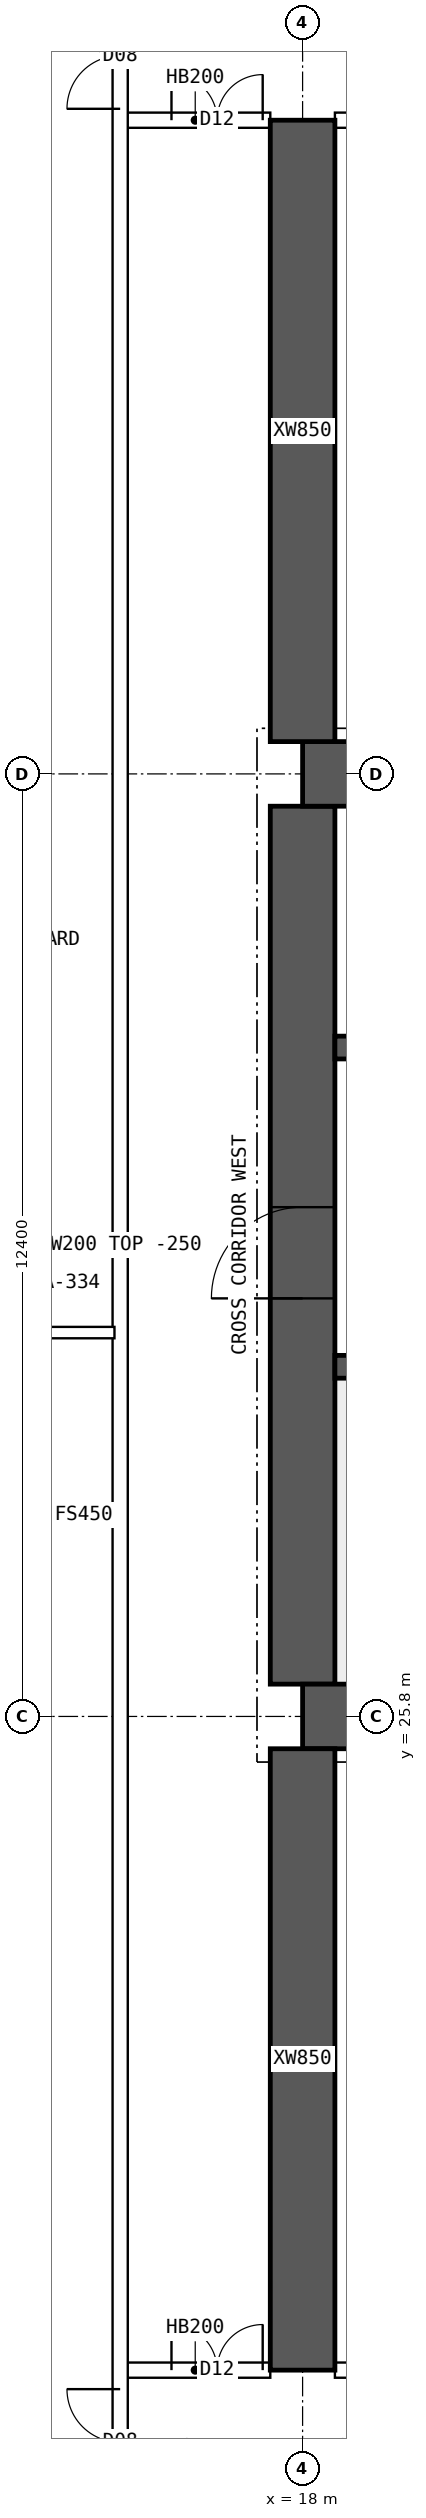
"""IFC4 building model, lengths in metres.
Left out: names, types, materials, properties, quantities, classifications, styles, units other than length and angle.
Written with IfcOpenShell. Run it as: python <this file> out.ifc"""

import sys

from ifc_helpers import new_model, si_unit, direction, frame, frame_2d, origin, place, context, subcontext, project, spatial, polyline, rectangle, outline, extrude, element, fill, save


model = new_model("IFC4")
c1 = context("Model", 3, precision=1e-05, world=origin(), true_north=direction((0.0, 1.0)))
c2 = subcontext(c1, "Body", "Model", "MODEL_VIEW")
j1 = project(units=[si_unit("LENGTHUNIT", "METRE"), si_unit("PLANEANGLEUNIT", "RADIAN")], contexts=[c1])
p1 = place(None, origin())
s1 = spatial("IfcSite", under=j1, at=p1, CompositionType="ELEMENT")
p2 = place(p1, origin())
s2 = spatial("IfcBuilding", under=s1, at=p2, CompositionType="ELEMENT")
p3 = place(p2, frame((0.0, 0.0, 193.6)))
s3 = spatial("IfcBuildingStorey", under=s2, at=p3, CompositionType="ELEMENT", Elevation=193.6)
for number, where, z_axis, x_axis in (
    (1, (18.0, 25.8, 0.0), (0.0, 0.0, 1.0), (1.0, 0.0, 0.0)),
    (2, (18.0, 38.2, 0.0), (0.0, 0.0, 1.0), (1.0, 0.0, 0.0)),
):
    element("IfcWall", number, at=place(p3, frame(where, z_axis=z_axis, x_axis=x_axis)), inside=s3, PredefinedType="SHEAR", context=c2, shape_type="SweptSolid", body=[
        extrude(rectangle(XDim=48.0, YDim=0.85, at=frame_2d((24.0, 0.0))), origin(), (0.0, 0.0, 1.0), 3.75),
    ])
p4 = place(p3, frame((18.0, 26.225, 0.0), z_axis=(0.0, 0.0, 1.0), x_axis=(0.0, 1.0, 0.0)))
e3 = element("IfcWall", 3, at=p4, inside=s3, PredefinedType="SHEAR", context=c2, shape_type="SweptSolid", body=[
    extrude(rectangle(XDim=11.55, YDim=0.85, at=frame_2d((5.775, 0.0))), origin(), (0.0, 0.0, 1.0), 3.75),
])
p5 = place(p4, frame((5.075, 0.0, 0.0)))
e4 = element("IfcOpeningElement", 4, at=p5, cuts=e3, PredefinedType="OPENING", context=c2, shape_type="SweptSolid", body=[
    extrude(rectangle(XDim=1.2, YDim=2.1, at=frame_2d((0.6, 1.05))), frame((0.0, 0.435, 0.0), z_axis=(0.0, -1.0, 0.0), x_axis=(1.0, 0.0, 0.0)), (0.0, 0.0, 1.0), 0.87),
])
p6 = place(p3, frame((18.425, 30.4, 0.0), z_axis=(0.0, 0.0, 1.0), x_axis=(1.0, 0.0, 0.0)))
e5 = element("IfcWall", 5, at=p6, inside=s3, PredefinedType="SHEAR", context=c2, shape_type="SweptSolid", body=[
    extrude(rectangle(XDim=47.15, YDim=0.3, at=frame_2d((23.575, 0.0))), origin(), (0.0, 0.0, 1.0), 3.75),
])
p7 = place(p6, frame((0.4, 0.0, 0.0)))
e6 = element("IfcOpeningElement", 6, at=p7, cuts=e5, PredefinedType="OPENING", context=c2, shape_type="SweptSolid", body=[
    extrude(rectangle(XDim=1.0, YDim=2.1, at=frame_2d((0.5, 1.05))), frame((0.0, 0.16, 0.0), z_axis=(0.0, -1.0, 0.0), x_axis=(1.0, 0.0, 0.0)), (0.0, 0.0, 1.0), 0.32),
])
p8 = place(p6, frame((45.75, 0.0, 0.0)))
e7 = element("IfcOpeningElement", 7, at=p8, cuts=e5, PredefinedType="OPENING", context=c2, shape_type="SweptSolid", body=[
    extrude(rectangle(XDim=1.0, YDim=2.1, at=frame_2d((0.5, 1.05))), frame((0.0, 0.16, 0.0), z_axis=(0.0, -1.0, 0.0), x_axis=(1.0, 0.0, 0.0)), (0.0, 0.0, 1.0), 0.32),
])
p9 = place(p6, frame((8.325, 0.0, 0.0)))
e8 = element("IfcOpeningElement", 8, at=p9, cuts=e5, PredefinedType="OPENING", context=c2, shape_type="SweptSolid", body=[
    extrude(rectangle(XDim=1.1, YDim=2.1, at=frame_2d((0.55, 1.05))), frame((0.0, 0.16, 0.0), z_axis=(0.0, -1.0, 0.0), x_axis=(1.0, 0.0, 0.0)), (0.0, 0.0, 1.0), 0.32),
])
p10 = place(p6, frame((10.925, 0.0, 0.0)))
e9 = element("IfcOpeningElement", 9, at=p10, cuts=e5, PredefinedType="OPENING", context=c2, shape_type="SweptSolid", body=[
    extrude(rectangle(XDim=1.1, YDim=2.1, at=frame_2d((0.55, 1.05))), frame((0.0, 0.16, 0.0), z_axis=(0.0, -1.0, 0.0), x_axis=(1.0, 0.0, 0.0)), (0.0, 0.0, 1.0), 0.32),
])
p11 = place(p6, frame((13.525, 0.0, 0.0)))
e10 = element("IfcOpeningElement", 10, at=p11, cuts=e5, PredefinedType="OPENING", context=c2, shape_type="SweptSolid", body=[
    extrude(rectangle(XDim=1.1, YDim=2.1, at=frame_2d((0.55, 1.05))), frame((0.0, 0.16, 0.0), z_axis=(0.0, -1.0, 0.0), x_axis=(1.0, 0.0, 0.0)), (0.0, 0.0, 1.0), 0.32),
])
p12 = place(p6, frame((16.125, 0.0, 0.0)))
e11 = element("IfcOpeningElement", 11, at=p12, cuts=e5, PredefinedType="OPENING", context=c2, shape_type="SweptSolid", body=[
    extrude(rectangle(XDim=1.1, YDim=2.1, at=frame_2d((0.55, 1.05))), frame((0.0, 0.16, 0.0), z_axis=(0.0, -1.0, 0.0), x_axis=(1.0, 0.0, 0.0)), (0.0, 0.0, 1.0), 0.32),
])
p13 = place(p6, frame((18.9, 0.0, 0.0)))
e12 = element("IfcOpeningElement", 12, at=p13, cuts=e5, PredefinedType="OPENING", context=c2, shape_type="SweptSolid", body=[
    extrude(rectangle(XDim=0.9, YDim=2.1, at=frame_2d((0.45, 1.05))), frame((0.0, 0.16, 0.0), z_axis=(0.0, -1.0, 0.0), x_axis=(1.0, 0.0, 0.0)), (0.0, 0.0, 1.0), 0.32),
])
p14 = place(p6, frame((30.192, 0.0, 0.0)))
e13 = element("IfcOpeningElement", 13, at=p14, cuts=e5, PredefinedType="OPENING", context=c2, shape_type="SweptSolid", body=[
    extrude(rectangle(XDim=1.1, YDim=2.1, at=frame_2d((0.55, 1.05))), frame((0.0, 0.16, 0.0), z_axis=(0.0, -1.0, 0.0), x_axis=(1.0, 0.0, 0.0)), (0.0, 0.0, 1.0), 0.32),
])
p15 = place(p6, frame((33.725, 0.0, 0.0)))
e14 = element("IfcOpeningElement", 14, at=p15, cuts=e5, PredefinedType="OPENING", context=c2, shape_type="SweptSolid", body=[
    extrude(rectangle(XDim=1.1, YDim=2.1, at=frame_2d((0.55, 1.05))), frame((0.0, 0.16, 0.0), z_axis=(0.0, -1.0, 0.0), x_axis=(1.0, 0.0, 0.0)), (0.0, 0.0, 1.0), 0.32),
])
p16 = place(p6, frame((37.258, 0.0, 0.0)))
e15 = element("IfcOpeningElement", 15, at=p16, cuts=e5, PredefinedType="OPENING", context=c2, shape_type="SweptSolid", body=[
    extrude(rectangle(XDim=1.1, YDim=2.1, at=frame_2d((0.55, 1.05))), frame((0.0, 0.16, 0.0), z_axis=(0.0, -1.0, 0.0), x_axis=(1.0, 0.0, 0.0)), (0.0, 0.0, 1.0), 0.32),
])
p17 = place(p3, frame((18.425, 34.6, 0.0), z_axis=(0.0, 0.0, 1.0), x_axis=(1.0, 0.0, 0.0)))
e16 = element("IfcWall", 16, at=p17, inside=s3, PredefinedType="SHEAR", context=c2, shape_type="SweptSolid", body=[
    extrude(rectangle(XDim=47.15, YDim=0.3, at=frame_2d((23.575, 0.0))), origin(), (0.0, 0.0, 1.0), 3.75),
])
p18 = place(p17, frame((0.9, 0.0, 0.0)))
e17 = element("IfcOpeningElement", 17, at=p18, cuts=e16, PredefinedType="OPENING", context=c2, shape_type="SweptSolid", body=[
    extrude(rectangle(XDim=1.1, YDim=2.1, at=frame_2d((0.55, 1.05))), frame((0.0, 0.16, 0.0), z_axis=(0.0, -1.0, 0.0), x_axis=(1.0, 0.0, 0.0)), (0.0, 0.0, 1.0), 0.32),
])
p19 = place(p17, frame((45.15, 0.0, 0.0)))
e18 = element("IfcOpeningElement", 18, at=p19, cuts=e16, PredefinedType="OPENING", context=c2, shape_type="SweptSolid", body=[
    extrude(rectangle(XDim=1.1, YDim=2.1, at=frame_2d((0.55, 1.05))), frame((0.0, 0.16, 0.0), z_axis=(0.0, -1.0, 0.0), x_axis=(1.0, 0.0, 0.0)), (0.0, 0.0, 1.0), 0.32),
])
p20 = place(p17, frame((4.175, 0.0, 0.0)))
e19 = element("IfcOpeningElement", 19, at=p20, cuts=e16, PredefinedType="OPENING", context=c2, shape_type="SweptSolid", body=[
    extrude(rectangle(XDim=0.9, YDim=2.1, at=frame_2d((0.45, 1.05))), frame((0.0, 0.16, 0.0), z_axis=(0.0, -1.0, 0.0), x_axis=(1.0, 0.0, 0.0)), (0.0, 0.0, 1.0), 0.32),
])
p21 = place(p17, frame((42.075, 0.0, 0.0)))
e20 = element("IfcOpeningElement", 20, at=p21, cuts=e16, PredefinedType="OPENING", context=c2, shape_type="SweptSolid", body=[
    extrude(rectangle(XDim=0.9, YDim=2.1, at=frame_2d((0.45, 1.05))), frame((0.0, 0.16, 0.0), z_axis=(0.0, -1.0, 0.0), x_axis=(1.0, 0.0, 0.0)), (0.0, 0.0, 1.0), 0.32),
])
p22 = place(p17, frame((8.95, 0.0, 0.0)))
e21 = element("IfcOpeningElement", 21, at=p22, cuts=e16, PredefinedType="OPENING", context=c2, shape_type="SweptSolid", body=[
    extrude(rectangle(XDim=0.9, YDim=2.1, at=frame_2d((0.45, 1.05))), frame((0.0, 0.16, 0.0), z_axis=(0.0, -1.0, 0.0), x_axis=(1.0, 0.0, 0.0)), (0.0, 0.0, 1.0), 0.32),
])
p23 = place(p17, frame((12.924, 0.0, 0.0)))
e22 = element("IfcOpeningElement", 22, at=p23, cuts=e16, PredefinedType="OPENING", context=c2, shape_type="SweptSolid", body=[
    extrude(rectangle(XDim=0.9, YDim=2.1, at=frame_2d((0.45, 1.05))), frame((0.0, 0.16, 0.0), z_axis=(0.0, -1.0, 0.0), x_axis=(1.0, 0.0, 0.0)), (0.0, 0.0, 1.0), 0.32),
])
p24 = place(p17, frame((16.571, 0.0, 0.0)))
e23 = element("IfcOpeningElement", 23, at=p24, cuts=e16, PredefinedType="OPENING", context=c2, shape_type="SweptSolid", body=[
    extrude(rectangle(XDim=0.9, YDim=2.1, at=frame_2d((0.45, 1.05))), frame((0.0, 0.16, 0.0), z_axis=(0.0, -1.0, 0.0), x_axis=(1.0, 0.0, 0.0)), (0.0, 0.0, 1.0), 0.32),
])
p25 = place(p17, frame((20.33, 0.0, 0.0)))
e24 = element("IfcOpeningElement", 24, at=p25, cuts=e16, PredefinedType="OPENING", context=c2, shape_type="SweptSolid", body=[
    extrude(rectangle(XDim=0.9, YDim=2.1, at=frame_2d((0.45, 1.05))), frame((0.0, 0.16, 0.0), z_axis=(0.0, -1.0, 0.0), x_axis=(1.0, 0.0, 0.0)), (0.0, 0.0, 1.0), 0.32),
])
p26 = place(p17, frame((24.736, 0.0, 0.0)))
e25 = element("IfcOpeningElement", 25, at=p26, cuts=e16, PredefinedType="OPENING", context=c2, shape_type="SweptSolid", body=[
    extrude(rectangle(XDim=0.9, YDim=2.1, at=frame_2d((0.45, 1.05))), frame((0.0, 0.16, 0.0), z_axis=(0.0, -1.0, 0.0), x_axis=(1.0, 0.0, 0.0)), (0.0, 0.0, 1.0), 0.32),
])
p27 = place(p17, frame((27.533, 0.0, 0.0)))
e26 = element("IfcOpeningElement", 26, at=p27, cuts=e16, PredefinedType="OPENING", context=c2, shape_type="SweptSolid", body=[
    extrude(rectangle(XDim=0.9, YDim=2.1, at=frame_2d((0.45, 1.05))), frame((0.0, 0.16, 0.0), z_axis=(0.0, -1.0, 0.0), x_axis=(1.0, 0.0, 0.0)), (0.0, 0.0, 1.0), 0.32),
])
p28 = place(p17, frame((29.703, 0.0, 0.0)))
e27 = element("IfcOpeningElement", 27, at=p28, cuts=e16, PredefinedType="OPENING", context=c2, shape_type="SweptSolid", body=[
    extrude(rectangle(XDim=0.9, YDim=2.1, at=frame_2d((0.45, 1.05))), frame((0.0, 0.16, 0.0), z_axis=(0.0, -1.0, 0.0), x_axis=(1.0, 0.0, 0.0)), (0.0, 0.0, 1.0), 0.32),
])
p29 = place(p17, frame((33.502, 0.0, 0.0)))
e28 = element("IfcOpeningElement", 28, at=p29, cuts=e16, PredefinedType="OPENING", context=c2, shape_type="SweptSolid", body=[
    extrude(rectangle(XDim=0.9, YDim=2.1, at=frame_2d((0.45, 1.05))), frame((0.0, 0.16, 0.0), z_axis=(0.0, -1.0, 0.0), x_axis=(1.0, 0.0, 0.0)), (0.0, 0.0, 1.0), 0.32),
])
p30 = place(p17, frame((37.453, 0.0, 0.0)))
e29 = element("IfcOpeningElement", 29, at=p30, cuts=e16, PredefinedType="OPENING", context=c2, shape_type="SweptSolid", body=[
    extrude(rectangle(XDim=0.9, YDim=2.1, at=frame_2d((0.45, 1.05))), frame((0.0, 0.16, 0.0), z_axis=(0.0, -1.0, 0.0), x_axis=(1.0, 0.0, 0.0)), (0.0, 0.0, 1.0), 0.32),
])
for number, where, z_axis, x_axis in (
    (30, (18.0, 17.2, 0.0), (0.0, 0.0, 1.0), (0.0, 1.0, 0.0)),
    (31, (18.0, 38.625, 0.0), (0.0, 0.0, 1.0), (0.0, 1.0, 0.0)),
):
    element("IfcWall", number, at=place(p3, frame(where, z_axis=z_axis, x_axis=x_axis)), inside=s3, PredefinedType="SHEAR", context=c2, shape_type="SweptSolid", body=[
        extrude(rectangle(XDim=8.175, YDim=0.85, at=frame_2d((4.087, 0.0))), origin(), (0.0, 0.0, 1.0), 3.75),
    ])
p31 = place(p3, frame((15.6, 17.2, 0.0), z_axis=(0.0, 0.0, 1.0), x_axis=(1.0, 0.0, 0.0)))
e32 = element("IfcWall", 32, at=p31, inside=s3, PredefinedType="SOLIDWALL", context=c2, shape_type="SweptSolid", body=[
    extrude(rectangle(XDim=1.975, YDim=0.2, at=frame_2d((0.987, 0.0))), origin(), (0.0, 0.0, 1.0), 3.5),
])
p32 = place(p31, frame((0.675, 0.0, 0.0)))
e33 = element("IfcOpeningElement", 33, at=p32, cuts=e32, PredefinedType="OPENING", context=c2, shape_type="SweptSolid", body=[
    extrude(rectangle(XDim=1.2, YDim=2.1, at=frame_2d((0.6, 1.05))), frame((0.0, 0.11, 0.0), z_axis=(0.0, -1.0, 0.0), x_axis=(1.0, 0.0, 0.0)), (0.0, 0.0, 1.0), 0.22),
])
p33 = place(p3, frame((18.425, 17.2, 0.0), z_axis=(0.0, 0.0, 1.0), x_axis=(1.0, 0.0, 0.0)))
e34 = element("IfcWall", 34, at=p33, inside=s3, PredefinedType="SOLIDWALL", context=c2, shape_type="SweptSolid", body=[
    extrude(rectangle(XDim=5.15, YDim=0.2, at=frame_2d((2.575, 0.0))), origin(), (0.0, 0.0, 1.0), 3.5),
])
p34 = place(p33, frame((0.35, 0.0, 0.0)))
e35 = element("IfcOpeningElement", 35, at=p34, cuts=e34, PredefinedType="OPENING", context=c2, shape_type="SweptSolid", body=[
    extrude(rectangle(XDim=0.9, YDim=2.1, at=frame_2d((0.45, 1.05))), frame((0.0, 0.11, 0.0), z_axis=(0.0, -1.0, 0.0), x_axis=(1.0, 0.0, 0.0)), (0.0, 0.0, 1.0), 0.22),
])
p35 = place(p33, frame((2.825, 0.0, 0.0)))
e36 = element("IfcOpeningElement", 36, at=p35, cuts=e34, PredefinedType="OPENING", context=c2, shape_type="SweptSolid", body=[
    extrude(rectangle(XDim=0.9, YDim=2.1, at=frame_2d((0.45, 1.05))), frame((0.0, 0.11, 0.0), z_axis=(0.0, -1.0, 0.0), x_axis=(1.0, 0.0, 0.0)), (0.0, 0.0, 1.0), 0.22),
])
p36 = place(p3, frame((15.6, 46.8, 0.0), z_axis=(0.0, 0.0, 1.0), x_axis=(1.0, 0.0, 0.0)))
e37 = element("IfcWall", 37, at=p36, inside=s3, PredefinedType="SOLIDWALL", context=c2, shape_type="SweptSolid", body=[
    extrude(rectangle(XDim=1.975, YDim=0.2, at=frame_2d((0.987, 0.0))), origin(), (0.0, 0.0, 1.0), 3.5),
])
p37 = place(p36, frame((0.675, 0.0, 0.0)))
e38 = element("IfcOpeningElement", 38, at=p37, cuts=e37, PredefinedType="OPENING", context=c2, shape_type="SweptSolid", body=[
    extrude(rectangle(XDim=1.2, YDim=2.1, at=frame_2d((0.6, 1.05))), frame((0.0, 0.11, 0.0), z_axis=(0.0, -1.0, 0.0), x_axis=(1.0, 0.0, 0.0)), (0.0, 0.0, 1.0), 0.22),
])
p38 = place(p3, frame((18.425, 46.8, 0.0), z_axis=(0.0, 0.0, 1.0), x_axis=(1.0, 0.0, 0.0)))
e39 = element("IfcWall", 39, at=p38, inside=s3, PredefinedType="SOLIDWALL", context=c2, shape_type="SweptSolid", body=[
    extrude(rectangle(XDim=5.15, YDim=0.2, at=frame_2d((2.575, 0.0))), origin(), (0.0, 0.0, 1.0), 3.5),
])
p39 = place(p38, frame((0.35, 0.0, 0.0)))
e40 = element("IfcOpeningElement", 40, at=p39, cuts=e39, PredefinedType="OPENING", context=c2, shape_type="SweptSolid", body=[
    extrude(rectangle(XDim=0.9, YDim=2.1, at=frame_2d((0.45, 1.05))), frame((0.0, 0.11, 0.0), z_axis=(0.0, -1.0, 0.0), x_axis=(1.0, 0.0, 0.0)), (0.0, 0.0, 1.0), 0.22),
])
p40 = place(p38, frame((2.925, 0.0, 0.0)))
e41 = element("IfcOpeningElement", 41, at=p40, cuts=e39, PredefinedType="OPENING", context=c2, shape_type="SweptSolid", body=[
    extrude(rectangle(XDim=0.9, YDim=2.1, at=frame_2d((0.45, 1.05))), frame((0.0, 0.11, 0.0), z_axis=(0.0, -1.0, 0.0), x_axis=(1.0, 0.0, 0.0)), (0.0, 0.0, 1.0), 0.22),
])
p41 = place(p3, frame((8.705, 30.85, 0.0), z_axis=(0.0, 0.0, 1.0), x_axis=(1.0, 0.0, 0.0)))
e42 = element("IfcWall", 42, at=p41, inside=s3, PredefinedType="PARTITIONING", context=c2, shape_type="SweptSolid", body=[
    extrude(outline(polyline([(0.0, 0.0), (6.82, 0.0), (6.82, 3.5), (3.597, 3.5), (3.595, 3.05), (2.997, 3.05), (2.995, 3.5), (0.0, 3.5), (0.0, 0.0)])), frame((0.0, 0.075, 0.0), z_axis=(0.0, -1.0, 0.0), x_axis=(1.0, 0.0, 0.0)), (0.0, 0.0, 1.0), 0.15),
])
p42 = place(p3, frame((15.6, 10.446, 0.0), z_axis=(0.0, 0.0, 1.0), x_axis=(0.0, 1.0, 0.0)))
e43 = element("IfcWall", 43, at=p42, inside=s3, PredefinedType="SOLIDWALL", context=c2, shape_type="SweptSolid", body=[
    extrude(rectangle(XDim=43.107, YDim=0.2, at=frame_2d((21.554, 0.0))), origin(), (0.0, 0.0, 1.0), 3.5),
])
p43 = place(p42, frame((5.104, 0.0, 0.0)))
e44 = element("IfcOpeningElement", 44, at=p43, cuts=e43, PredefinedType="OPENING", context=c2, shape_type="SweptSolid", body=[
    extrude(rectangle(XDim=1.4, YDim=2.1, at=frame_2d((0.7, 1.05))), frame((0.0, 0.11, 0.0), z_axis=(0.0, -1.0, 0.0), x_axis=(1.0, 0.0, 0.0)), (0.0, 0.0, 1.0), 0.22),
])
p44 = place(p42, frame((36.504, 0.0, 0.0)))
e45 = element("IfcOpeningElement", 45, at=p44, cuts=e43, PredefinedType="OPENING", context=c2, shape_type="SweptSolid", body=[
    extrude(rectangle(XDim=1.4, YDim=2.1, at=frame_2d((0.7, 1.05))), frame((0.0, 0.11, 0.0), z_axis=(0.0, -1.0, 0.0), x_axis=(1.0, 0.0, 0.0)), (0.0, 0.0, 1.0), 0.22),
])
p45 = place(p5, origin())
e46 = element("IfcDoor", 46, at=p45, inside=s3, OperationType="SINGLE_SWING_LEFT", PredefinedType="DOOR", context=c2, shape_type="SweptSolid", body=[
    extrude(rectangle(XDim=1.2, YDim=2.1, at=frame_2d((0.6, 1.05))), frame((0.0, 0.025, 0.0), z_axis=(0.0, -1.0, 0.0), x_axis=(1.0, 0.0, 0.0)), (0.0, 0.0, 1.0), 0.05),
])
fill(e4, e46)
p46 = place(p32, origin())
e47 = element("IfcDoor", 47, at=p46, inside=s3, OperationType="DOUBLE_DOOR_SINGLE_SWING", PredefinedType="DOOR", context=c2, shape_type="SweptSolid", body=[
    extrude(rectangle(XDim=1.2, YDim=2.1, at=frame_2d((0.6, 1.05))), frame((0.0, 0.025, 0.0), z_axis=(0.0, -1.0, 0.0), x_axis=(1.0, 0.0, 0.0)), (0.0, 0.0, 1.0), 0.05),
])
fill(e33, e47)
p47 = place(p37, origin())
e48 = element("IfcDoor", 48, at=p47, inside=s3, OperationType="DOUBLE_DOOR_SINGLE_SWING", PredefinedType="DOOR", context=c2, shape_type="SweptSolid", body=[
    extrude(rectangle(XDim=1.2, YDim=2.1, at=frame_2d((0.6, 1.05))), frame((0.0, 0.025, 0.0), z_axis=(0.0, -1.0, 0.0), x_axis=(1.0, 0.0, 0.0)), (0.0, 0.0, 1.0), 0.05),
])
fill(e38, e48)
p48 = place(p43, origin())
e49 = element("IfcDoor", 49, at=p48, inside=s3, OperationType="DOUBLE_DOOR_SINGLE_SWING", PredefinedType="DOOR", context=c2, shape_type="SweptSolid", body=[
    extrude(rectangle(XDim=1.4, YDim=2.1, at=frame_2d((0.7, 1.05))), frame((0.0, 0.025, 0.0), z_axis=(0.0, -1.0, 0.0), x_axis=(1.0, 0.0, 0.0)), (0.0, 0.0, 1.0), 0.05),
])
fill(e44, e49)
p49 = place(p44, origin())
e50 = element("IfcDoor", 50, at=p49, inside=s3, OperationType="DOUBLE_DOOR_SINGLE_SWING", PredefinedType="DOOR", context=c2, shape_type="SweptSolid", body=[
    extrude(rectangle(XDim=1.4, YDim=2.1, at=frame_2d((0.7, 1.05))), frame((0.0, 0.025, 0.0), z_axis=(0.0, -1.0, 0.0), x_axis=(1.0, 0.0, 0.0)), (0.0, 0.0, 1.0), 0.05),
])
fill(e45, e50)
save(model, sys.argv[1])
